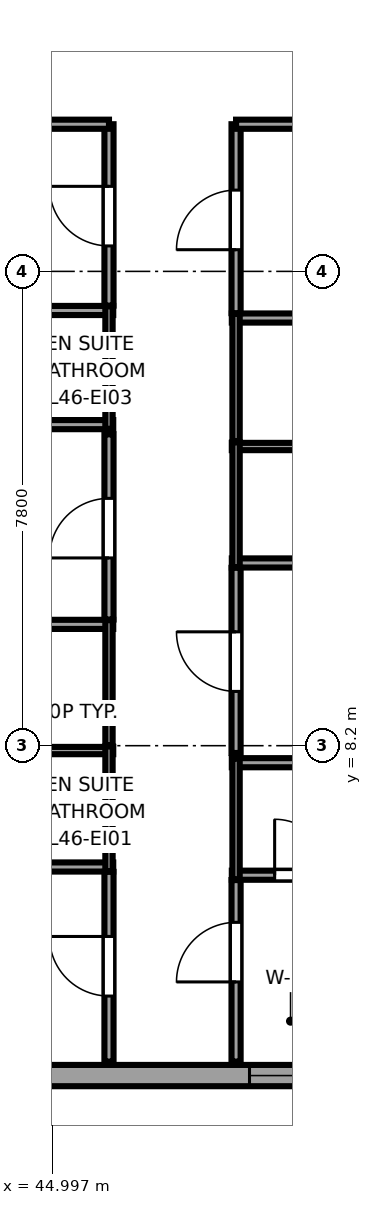
"""IFC4 building model, lengths in metres.
Left out: names, types, materials, properties, quantities, classifications, styles, units other than length and angle.
Written with IfcOpenShell. Run it as: python <this file> out.ifc"""

import sys

from ifc_helpers import new_model, si_unit, direction, frame, frame_2d, origin, place, context, subcontext, project, spatial, rectangle, extrude, source, transform, mapped, element, fill, save


model = new_model("IFC4")
c1 = context("Model", 3, precision=1e-05, world=origin(), true_north=direction((0.0, 1.0)))
c2 = subcontext(c1, "Body", "Model", "MODEL_VIEW")
j1 = project(units=[si_unit("LENGTHUNIT", "METRE"), si_unit("PLANEANGLEUNIT", "RADIAN")], contexts=[c1])
p1 = place(None, origin())
s1 = spatial("IfcSite", under=j1, at=p1, CompositionType="ELEMENT")
p2 = place(p1, origin())
s2 = spatial("IfcBuilding", under=s1, at=p2, CompositionType="ELEMENT")
p3 = place(p2, frame((0.0, 0.0, 175.45)))
s3 = spatial("IfcBuildingStorey", under=s2, at=p3, CompositionType="ELEMENT", Elevation=175.45)
p4 = place(p3, frame((34.375, 2.775, 0.0), z_axis=(0.0, 0.0, 1.0), x_axis=(1.0, 0.0, 0.0)))
e1 = element("IfcWall", 1, at=p4, inside=s3, PredefinedType="SOLIDWALL", context=c2, shape_type="SweptSolid", body=[
    extrude(rectangle(XDim=15.608, YDim=0.35, at=frame_2d((7.804, 0.0))), origin(), (0.0, 0.0, 1.0), 3.37),
])
p5 = place(p4, frame((1.801, 0.0, 0.68)))
e2 = element("IfcOpeningElement", 2, at=p5, cuts=e1, PredefinedType="OPENING", context=c2, shape_type="SweptSolid", body=[
    extrude(rectangle(XDim=2.4, YDim=1.9, at=frame_2d((1.2, 0.95))), frame((0.0, 0.185, 0.0), z_axis=(0.0, -1.0, 0.0), x_axis=(1.0, 0.0, 0.0)), (0.0, 0.0, 1.0), 0.37),
])
p6 = place(p4, frame((13.866, 0.0, 0.58)))
e3 = element("IfcOpeningElement", 3, at=p6, cuts=e1, PredefinedType="OPENING", context=c2, shape_type="SweptSolid", body=[
    extrude(rectangle(XDim=1.35, YDim=1.6, at=frame_2d((0.675, 0.8))), frame((0.0, 0.185, 0.0), z_axis=(0.0, -1.0, 0.0), x_axis=(1.0, 0.0, 0.0)), (0.0, 0.0, 1.0), 0.37),
])
p7 = place(p3, frame((43.41, 6.205, 0.0), z_axis=(0.0, 0.0, 1.0), x_axis=(1.0, 0.0, 0.0)))
e4 = element("IfcWall", 4, at=p7, inside=s3, PredefinedType="PARTITIONING", context=c2, shape_type="SweptSolid", body=[
    extrude(rectangle(XDim=2.59, YDim=0.15, at=frame_2d((1.295, 0.0))), origin(), (0.0, 0.0, 1.0), 3.37),
])
p8 = place(p3, frame((43.41, 8.12, 0.0), z_axis=(0.0, 0.0, 1.0), x_axis=(1.0, 0.0, 0.0)))
e5 = element("IfcWall", 5, at=p8, inside=s3, PredefinedType="PLUMBINGWALL", context=c2, shape_type="SweptSolid", body=[
    extrude(rectangle(XDim=2.59, YDim=0.12, at=frame_2d((1.295, 0.0))), origin(), (0.0, 0.0, 1.0), 2.758),
])
p9 = place(p3, frame((45.93, 6.135, 0.0), z_axis=(0.0, 0.0, 1.0), x_axis=(0.0, 1.0, 0.0)))
e6 = element("IfcWall", 6, at=p9, inside=s3, PredefinedType="PLUMBINGWALL", context=c2, shape_type="SweptSolid", body=[
    extrude(rectangle(XDim=2.055, YDim=0.12, at=frame_2d((1.027, 0.0))), origin(), (0.0, 0.0, 1.0), 3.37),
])
p10 = place(p3, frame((43.41, 10.195, 0.0), z_axis=(0.0, 0.0, 1.0), x_axis=(1.0, 0.0, 0.0)))
e7 = element("IfcWall", 7, at=p10, inside=s3, PredefinedType="PARTITIONING", context=c2, shape_type="SweptSolid", body=[
    extrude(rectangle(XDim=2.59, YDim=0.15, at=frame_2d((1.295, 0.0))), origin(), (0.0, 0.0, 1.0), 3.37),
])
p11 = place(p3, frame((45.93, 8.21, 0.0), z_axis=(0.0, 0.0, 1.0), x_axis=(0.0, 1.0, 0.0)))
e8 = element("IfcWall", 8, at=p11, inside=s3, PredefinedType="PLUMBINGWALL", context=c2, shape_type="SweptSolid", body=[
    extrude(rectangle(XDim=2.055, YDim=0.12, at=frame_2d((1.027, 0.0))), origin(), (0.0, 0.0, 1.0), 3.37),
])
p12 = place(p3, frame((34.65, 13.48, 0.0), z_axis=(0.0, 0.0, 1.0), x_axis=(1.0, 0.0, 0.0)))
e9 = element("IfcWall", 9, at=p12, inside=s3, PredefinedType="PARTITIONING", context=c2, shape_type="SweptSolid", body=[
    extrude(rectangle(XDim=11.35, YDim=0.15, at=frame_2d((5.675, 0.0))), origin(), (0.0, 0.0, 1.0), 3.37),
])
p13 = place(p3, frame((43.41, 15.357, 0.0), z_axis=(0.0, 0.0, 1.0), x_axis=(1.0, 0.0, 0.0)))
e10 = element("IfcWall", 10, at=p13, inside=s3, PredefinedType="PARTITIONING", context=c2, shape_type="SweptSolid", body=[
    extrude(rectangle(XDim=2.59, YDim=0.15, at=frame_2d((1.295, 0.0))), origin(), (0.0, 0.0, 1.0), 3.37),
])
p14 = place(p3, frame((45.93, 13.41, 0.0), z_axis=(0.0, 0.0, 1.0), x_axis=(0.0, 1.0, 0.0)))
e11 = element("IfcWall", 11, at=p14, inside=s3, PredefinedType="PLUMBINGWALL", context=c2, shape_type="SweptSolid", body=[
    extrude(rectangle(XDim=2.017, YDim=0.12, at=frame_2d((1.009, 0.0))), origin(), (0.0, 0.0, 1.0), 3.37),
])
p15 = place(p3, frame((47.95, 6.07, 0.0), z_axis=(0.0, 0.0, 1.0), x_axis=(1.0, 0.0, 0.0)))
e12 = element("IfcWall", 12, at=p15, inside=s3, PredefinedType="PARTITIONING", context=c2, shape_type="SweptSolid", body=[
    extrude(rectangle(XDim=2.329, YDim=0.15, at=frame_2d((1.165, 0.0))), origin(), (0.0, 0.0, 1.0), 3.37),
])
p16 = place(p15, frame((0.705, 0.0, 0.0)))
e13 = element("IfcOpeningElement", 13, at=p16, cuts=e12, PredefinedType="OPENING", context=c2, shape_type="SweptSolid", body=[
    extrude(rectangle(XDim=0.92, YDim=2.01, at=frame_2d((0.46, 1.005))), frame((0.0, 0.085, 0.0), z_axis=(0.0, -1.0, 0.0), x_axis=(1.0, 0.0, 0.0)), (0.0, 0.0, 1.0), 0.17),
])
p17 = place(p3, frame((47.95, 7.92, 0.0), z_axis=(0.0, 0.0, 1.0), x_axis=(1.0, 0.0, 0.0)))
e14 = element("IfcWall", 14, at=p17, inside=s3, PredefinedType="PARTITIONING", context=c2, shape_type="SweptSolid", body=[
    extrude(rectangle(XDim=2.329, YDim=0.15, at=frame_2d((1.165, 0.0))), origin(), (0.0, 0.0, 1.0), 3.37),
])
p18 = place(p3, frame((48.02, 6.0, 0.0), z_axis=(0.0, 0.0, 1.0), x_axis=(0.0, 1.0, 0.0)))
e15 = element("IfcWall", 15, at=p18, inside=s3, PredefinedType="PLUMBINGWALL", context=c2, shape_type="SweptSolid", body=[
    extrude(rectangle(XDim=1.99, YDim=0.12, at=frame_2d((0.995, 0.0))), origin(), (0.0, 0.0, 1.0), 3.37),
])
p19 = place(p3, frame((47.95, 11.205, 0.0), z_axis=(0.0, 0.0, 1.0), x_axis=(1.0, 0.0, 0.0)))
e16 = element("IfcWall", 16, at=p19, inside=s3, PredefinedType="PARTITIONING", context=c2, shape_type="SweptSolid", body=[
    extrude(rectangle(XDim=2.329, YDim=0.15, at=frame_2d((1.165, 0.0))), origin(), (0.0, 0.0, 1.0), 3.37),
])
p20 = place(p3, frame((47.95, 13.12, 0.0), z_axis=(0.0, 0.0, 1.0), x_axis=(1.0, 0.0, 0.0)))
e17 = element("IfcWall", 17, at=p20, inside=s3, PredefinedType="PLUMBINGWALL", context=c2, shape_type="SweptSolid", body=[
    extrude(rectangle(XDim=2.329, YDim=0.12, at=frame_2d((1.165, 0.0))), origin(), (0.0, 0.0, 1.0), 3.37),
])
p21 = place(p3, frame((48.02, 11.135, 0.0), z_axis=(0.0, 0.0, 1.0), x_axis=(0.0, 1.0, 0.0)))
e18 = element("IfcWall", 18, at=p21, inside=s3, PredefinedType="PLUMBINGWALL", context=c2, shape_type="SweptSolid", body=[
    extrude(rectangle(XDim=2.055, YDim=0.12, at=frame_2d((1.027, 0.0))), origin(), (0.0, 0.0, 1.0), 3.37),
])
p22 = place(p3, frame((47.95, 15.233, 0.0), z_axis=(0.0, 0.0, 1.0), x_axis=(1.0, 0.0, 0.0)))
e19 = element("IfcWall", 19, at=p22, inside=s3, PredefinedType="PARTITIONING", context=c2, shape_type="SweptSolid", body=[
    extrude(rectangle(XDim=2.329, YDim=0.15, at=frame_2d((1.165, 0.0))), origin(), (0.0, 0.0, 1.0), 3.37),
])
p23 = place(p3, frame((48.02, 13.21, 0.0), z_axis=(0.0, 0.0, 1.0), x_axis=(0.0, 1.0, 0.0)))
e20 = element("IfcWall", 20, at=p23, inside=s3, PredefinedType="PLUMBINGWALL", context=c2, shape_type="SweptSolid", body=[
    extrude(rectangle(XDim=2.093, YDim=0.12, at=frame_2d((1.046, 0.0))), origin(), (0.0, 0.0, 1.0), 3.37),
])
p24 = place(p3, frame((45.93, 3.005, 0.0), z_axis=(0.0, 0.0, 1.0), x_axis=(0.0, 1.0, 0.0)))
e21 = element("IfcWall", 21, at=p24, inside=s3, PredefinedType="PARTITIONING", context=c2, shape_type="SweptSolid", body=[
    extrude(rectangle(XDim=3.12, YDim=0.15, at=frame_2d((1.56, 0.0))), origin(), (0.0, 0.0, 1.0), 3.37),
])
p25 = place(p24, frame((1.077, 0.0, 0.0)))
e22 = element("IfcOpeningElement", 22, at=p25, cuts=e21, PredefinedType="OPENING", context=c2, shape_type="SweptSolid", body=[
    extrude(rectangle(XDim=0.98, YDim=2.12, at=frame_2d((0.49, 1.06))), frame((0.0, 0.085, 0.0), z_axis=(0.0, -1.0, 0.0), x_axis=(1.0, 0.0, 0.0)), (0.0, 0.0, 1.0), 0.17),
])
p26 = place(p3, frame((45.93, 10.275, 0.0), z_axis=(0.0, 0.0, 1.0), x_axis=(0.0, 1.0, 0.0)))
e23 = element("IfcWall", 23, at=p26, inside=s3, PredefinedType="PARTITIONING", context=c2, shape_type="SweptSolid", body=[
    extrude(rectangle(XDim=3.045, YDim=0.15, at=frame_2d((1.522, 0.0))), origin(), (0.0, 0.0, 1.0), 3.37),
])
p27 = place(p26, frame((1.012, 0.0, 0.0)))
e24 = element("IfcOpeningElement", 24, at=p27, cuts=e23, PredefinedType="OPENING", context=c2, shape_type="SweptSolid", body=[
    extrude(rectangle(XDim=0.98, YDim=2.12, at=frame_2d((0.49, 1.06))), frame((0.0, 0.085, 0.0), z_axis=(0.0, -1.0, 0.0), x_axis=(1.0, 0.0, 0.0)), (0.0, 0.0, 1.0), 0.17),
])
p28 = place(p3, frame((45.93, 15.437, 0.0), z_axis=(0.0, 0.0, 1.0), x_axis=(0.0, 1.0, 0.0)))
e25 = element("IfcWall", 25, at=p28, inside=s3, PredefinedType="PARTITIONING", context=c2, shape_type="SweptSolid", body=[
    extrude(rectangle(XDim=2.983, YDim=0.15, at=frame_2d((1.491, 0.0))), origin(), (0.0, 0.0, 1.0), 3.37),
])
p29 = place(p28, frame((0.981, 0.0, 0.0)))
e26 = element("IfcOpeningElement", 26, at=p29, cuts=e25, PredefinedType="OPENING", context=c2, shape_type="SweptSolid", body=[
    extrude(rectangle(XDim=0.98, YDim=2.12, at=frame_2d((0.49, 1.06))), frame((0.0, 0.085, 0.0), z_axis=(0.0, -1.0, 0.0), x_axis=(1.0, 0.0, 0.0)), (0.0, 0.0, 1.0), 0.17),
])
p30 = place(p3, frame((34.65, 18.42, 0.0), z_axis=(0.0, 0.0, 1.0), x_axis=(1.0, 0.0, 0.0)))
e27 = element("IfcWall", 27, at=p30, inside=s3, PredefinedType="PARTITIONING", context=c2, shape_type="SweptSolid", body=[
    extrude(rectangle(XDim=11.28, YDim=0.15, at=frame_2d((5.64, 0.0))), origin(), (0.0, 0.0, 1.0), 3.37),
])
p31 = place(p3, frame((48.02, 3.005, 0.0), z_axis=(0.0, 0.0, 1.0), x_axis=(0.0, 1.0, 0.0)))
e28 = element("IfcWall", 28, at=p31, inside=s3, PredefinedType="PARTITIONING", context=c2, shape_type="SweptSolid", body=[
    extrude(rectangle(XDim=2.985, YDim=0.15, at=frame_2d((1.493, 0.0))), origin(), (0.0, 0.0, 1.0), 3.37),
])
p32 = place(p31, frame((1.31, 0.0, 0.0)))
e29 = element("IfcOpeningElement", 29, at=p32, cuts=e28, PredefinedType="OPENING", context=c2, shape_type="SweptSolid", body=[
    extrude(rectangle(XDim=0.98, YDim=2.12, at=frame_2d((0.49, 1.06))), frame((0.0, 0.085, 0.0), z_axis=(0.0, -1.0, 0.0), x_axis=(1.0, 0.0, 0.0)), (0.0, 0.0, 1.0), 0.17),
])
p33 = place(p3, frame((48.02, 8.08, 0.0), z_axis=(0.0, 0.0, 1.0), x_axis=(0.0, 1.0, 0.0)))
e30 = element("IfcWall", 30, at=p33, inside=s3, PredefinedType="PARTITIONING", context=c2, shape_type="SweptSolid", body=[
    extrude(rectangle(XDim=3.045, YDim=0.15, at=frame_2d((1.522, 0.0))), origin(), (0.0, 0.0, 1.0), 3.37),
])
p34 = place(p33, frame((1.012, 0.0, 0.0)))
e31 = element("IfcOpeningElement", 31, at=p34, cuts=e30, PredefinedType="OPENING", context=c2, shape_type="SweptSolid", body=[
    extrude(rectangle(XDim=0.98, YDim=2.12, at=frame_2d((0.49, 1.06))), frame((0.0, 0.085, 0.0), z_axis=(0.0, -1.0, 0.0), x_axis=(1.0, 0.0, 0.0)), (0.0, 0.0, 1.0), 0.17),
])
p35 = place(p3, frame((48.02, 15.313, 0.0), z_axis=(0.0, 0.0, 1.0), x_axis=(0.0, 1.0, 0.0)))
e32 = element("IfcWall", 32, at=p35, inside=s3, PredefinedType="PARTITIONING", context=c2, shape_type="SweptSolid", body=[
    extrude(rectangle(XDim=3.107, YDim=0.15, at=frame_2d((1.553, 0.0))), origin(), (0.0, 0.0, 1.0), 3.37),
])
p36 = place(p35, frame((1.043, 0.0, 0.0)))
e33 = element("IfcOpeningElement", 33, at=p36, cuts=e32, PredefinedType="OPENING", context=c2, shape_type="SweptSolid", body=[
    extrude(rectangle(XDim=0.98, YDim=2.12, at=frame_2d((0.49, 1.06))), frame((0.0, 0.085, 0.0), z_axis=(0.0, -1.0, 0.0), x_axis=(1.0, 0.0, 0.0)), (0.0, 0.0, 1.0), 0.17),
])
p37 = place(p3, frame((48.02, 18.42, 0.0), z_axis=(0.0, 0.0, 1.0), x_axis=(1.0, 0.0, 0.0)))
e34 = element("IfcWall", 34, at=p37, inside=s3, PredefinedType="PARTITIONING", context=c2, shape_type="SweptSolid", body=[
    extrude(rectangle(XDim=5.975, YDim=0.15, at=frame_2d((2.988, 0.0))), origin(), (0.0, 0.0, 1.0), 3.37),
])
m1 = source(origin(), c2, "Body", "SweptSolid", [
    extrude(rectangle(XDim=1.35, YDim=1.6, at=frame_2d((0.675, 0.8))), frame((0.0, 0.09, 0.0), z_axis=(0.0, -1.0, 0.0), x_axis=(1.0, 0.0, 0.0)), (0.0, 0.0, 1.0), 0.06),
])
p38 = place(p6, origin())
e35 = element("IfcWindow", 35, at=p38, inside=s3, PartitioningType="SINGLE_PANEL", PredefinedType="WINDOW", context=c2, shape_type="MappedRepresentation", body=[
    mapped(m1, transform((0.0, 0.0, 0.0), x_axis=(1.0, 0.0, 0.0), y_axis=(0.0, 1.0, 0.0), z_axis=(0.0, 0.0, 1.0), scale=1.0)),
])
fill(e3, e35)
m2 = source(origin(), c2, "Body", "SweptSolid", [
    extrude(rectangle(XDim=0.92, YDim=2.01, at=frame_2d((0.46, 1.005))), frame((0.0, 0.025, 0.0), z_axis=(0.0, -1.0, 0.0), x_axis=(1.0, 0.0, 0.0)), (0.0, 0.0, 1.0), 0.05),
])
p39 = place(p16, origin())
e36 = element("IfcDoor", 36, at=p39, inside=s3, OperationType="SINGLE_SWING_LEFT", PredefinedType="DOOR", context=c2, shape_type="MappedRepresentation", body=[
    mapped(m2, transform((0.0, 0.0, 0.0), x_axis=(1.0, 0.0, 0.0), y_axis=(0.0, 1.0, 0.0), z_axis=(0.0, 0.0, 1.0), scale=1.0)),
])
fill(e13, e36)
m3 = source(origin(), c2, "Body", "SweptSolid", [
    extrude(rectangle(XDim=0.98, YDim=2.12, at=frame_2d((0.49, 1.06))), frame((0.0, 0.025, 0.0), z_axis=(0.0, -1.0, 0.0), x_axis=(1.0, 0.0, 0.0)), (0.0, 0.0, 1.0), 0.05),
])
p40 = place(p25, origin())
e37 = element("IfcDoor", 37, at=p40, inside=s3, OperationType="SINGLE_SWING_RIGHT", PredefinedType="DOOR", context=c2, shape_type="MappedRepresentation", body=[
    mapped(m3, transform((0.0, 0.0, 0.0), x_axis=(1.0, 0.0, 0.0), y_axis=(0.0, 1.0, 0.0), z_axis=(0.0, 0.0, 1.0), scale=1.0)),
])
fill(e22, e37)
p41 = place(p27, origin())
e38 = element("IfcDoor", 38, at=p41, inside=s3, OperationType="SINGLE_SWING_LEFT", PredefinedType="DOOR", context=c2, shape_type="MappedRepresentation", body=[
    mapped(m3, transform((0.0, 0.0, 0.0), x_axis=(1.0, 0.0, 0.0), y_axis=(0.0, 1.0, 0.0), z_axis=(0.0, 0.0, 1.0), scale=1.0)),
])
fill(e24, e38)
p42 = place(p29, origin())
e39 = element("IfcDoor", 39, at=p42, inside=s3, OperationType="SINGLE_SWING_RIGHT", PredefinedType="DOOR", context=c2, shape_type="MappedRepresentation", body=[
    mapped(m3, transform((0.0, 0.0, 0.0), x_axis=(1.0, 0.0, 0.0), y_axis=(0.0, 1.0, 0.0), z_axis=(0.0, 0.0, 1.0), scale=1.0)),
])
fill(e26, e39)
p43 = place(p32, origin())
e40 = element("IfcDoor", 40, at=p43, inside=s3, OperationType="SINGLE_SWING_LEFT", PredefinedType="DOOR", context=c2, shape_type="MappedRepresentation", body=[
    mapped(m3, transform((0.0, 0.0, 0.0), x_axis=(1.0, 0.0, 0.0), y_axis=(0.0, 1.0, 0.0), z_axis=(0.0, 0.0, 1.0), scale=1.0)),
])
fill(e29, e40)
p44 = place(p34, origin())
e41 = element("IfcDoor", 41, at=p44, inside=s3, OperationType="SINGLE_SWING_RIGHT", PredefinedType="DOOR", context=c2, shape_type="MappedRepresentation", body=[
    mapped(m3, transform((0.0, 0.0, 0.0), x_axis=(1.0, 0.0, 0.0), y_axis=(0.0, 1.0, 0.0), z_axis=(0.0, 0.0, 1.0), scale=1.0)),
])
fill(e31, e41)
p45 = place(p36, origin())
e42 = element("IfcDoor", 42, at=p45, inside=s3, OperationType="SINGLE_SWING_LEFT", PredefinedType="DOOR", context=c2, shape_type="MappedRepresentation", body=[
    mapped(m3, transform((0.0, 0.0, 0.0), x_axis=(1.0, 0.0, 0.0), y_axis=(0.0, 1.0, 0.0), z_axis=(0.0, 0.0, 1.0), scale=1.0)),
])
fill(e33, e42)
save(model, sys.argv[1])
